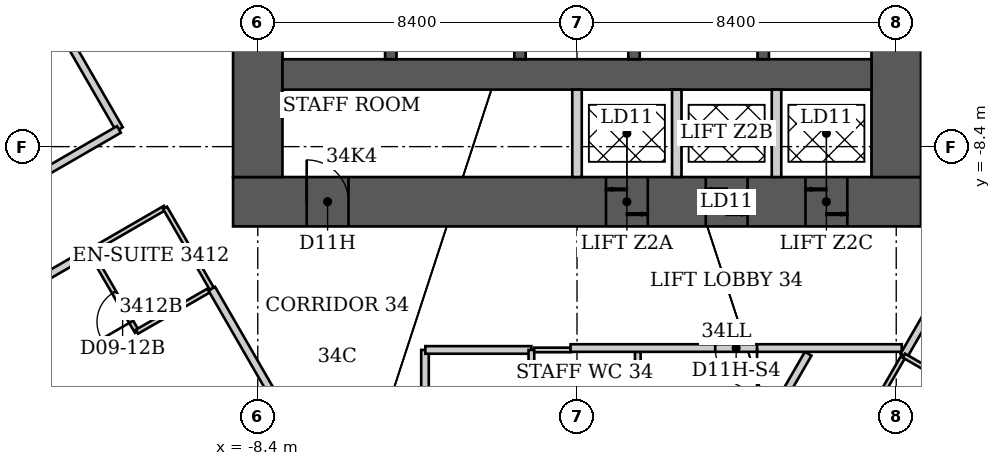
"""IFC4 building model, lengths in metres.
Left out: names, types, materials, properties, quantities, classifications, styles, units other than length and angle.
Written with IfcOpenShell. Run it as: python <this file> out.ifc"""

import sys

from ifc_helpers import new_model, si_unit, direction, frame, frame_2d, origin, place, context, subcontext, project, spatial, rectangle, extrude, element, fill, save


model = new_model("IFC4")
c1 = context("Model", 3, precision=1e-05, world=origin(), true_north=direction((0.0, 1.0)))
c2 = subcontext(c1, "Body", "Model", "MODEL_VIEW")
j1 = project(units=[si_unit("LENGTHUNIT", "METRE"), si_unit("PLANEANGLEUNIT", "RADIAN")], contexts=[c1])
p1 = place(None, origin())
s1 = spatial("IfcSite", under=j1, at=p1, CompositionType="ELEMENT")
p2 = place(p1, origin())
s2 = spatial("IfcBuilding", under=s1, at=p2, CompositionType="ELEMENT")
p3 = place(p2, frame((0.0, 0.0, 138.6)))
s3 = spatial("IfcBuildingStorey", under=s2, at=p3, CompositionType="ELEMENT", Elevation=138.6)
p4 = place(p3, frame((-9.05, -9.85, 0.0), z_axis=(0.0, 0.0, 1.0), x_axis=(1.0, 0.0, 0.0)))
e1 = element("IfcWall", 1, at=p4, inside=s3, PredefinedType="SHEAR", context=c2, shape_type="SweptSolid", body=[
    extrude(rectangle(XDim=18.1, YDim=1.3, at=frame_2d((9.05, 0.0))), origin(), (0.0, 0.0, 1.0), 3.8),
])
p5 = place(p4, frame((1.938, 0.0, 0.0)))
e2 = element("IfcOpeningElement", 2, at=p5, cuts=e1, PredefinedType="OPENING", context=c2, shape_type="SweptSolid", body=[
    extrude(rectangle(XDim=1.1, YDim=2.2, at=frame_2d((0.55, 1.1))), frame((0.0, 0.65, 0.0), z_axis=(0.0, -1.0, 0.0), x_axis=(1.0, 0.0, 0.0)), (0.0, 0.0, 1.0), 1.3),
])
p6 = place(p4, frame((9.812, 0.0, 0.0)))
e3 = element("IfcOpeningElement", 3, at=p6, cuts=e1, PredefinedType="OPENING", context=c2, shape_type="SweptSolid", body=[
    extrude(rectangle(XDim=1.1, YDim=2.1, at=frame_2d((0.55, 1.05))), frame((0.0, 0.65, 0.0), z_axis=(0.0, -1.0, 0.0), x_axis=(1.0, 0.0, 0.0)), (0.0, 0.0, 1.0), 1.3),
])
p7 = place(p4, frame((12.438, 0.0, 0.0)))
e4 = element("IfcOpeningElement", 4, at=p7, cuts=e1, PredefinedType="OPENING", context=c2, shape_type="SweptSolid", body=[
    extrude(rectangle(XDim=1.1, YDim=2.1, at=frame_2d((0.55, 1.05))), frame((0.0, 0.65, 0.0), z_axis=(0.0, -1.0, 0.0), x_axis=(1.0, 0.0, 0.0)), (0.0, 0.0, 1.0), 1.3),
])
p8 = place(p4, frame((15.062, 0.0, 0.0)))
e5 = element("IfcOpeningElement", 5, at=p8, cuts=e1, PredefinedType="OPENING", context=c2, shape_type="SweptSolid", body=[
    extrude(rectangle(XDim=1.1, YDim=2.1, at=frame_2d((0.55, 1.05))), frame((0.0, 0.65, 0.0), z_axis=(0.0, -1.0, 0.0), x_axis=(1.0, 0.0, 0.0)), (0.0, 0.0, 1.0), 1.3),
])
p9 = place(p3, frame((-8.4, -9.2, 0.0), z_axis=(0.0, 0.0, 1.0), x_axis=(0.0, 1.0, 0.0)))
e6 = element("IfcWall", 6, at=p9, inside=s3, PredefinedType="SHEAR", context=c2, shape_type="SweptSolid", body=[
    extrude(rectangle(XDim=15.3, YDim=1.3, at=frame_2d((7.65, 0.0))), origin(), (0.0, 0.0, 1.0), 3.8),
])
p10 = place(p9, frame((10.7, 0.0, 0.0)))
e7 = element("IfcOpeningElement", 7, at=p10, cuts=e6, PredefinedType="OPENING", context=c2, shape_type="SweptSolid", body=[
    extrude(rectangle(XDim=1.2, YDim=2.2, at=frame_2d((0.6, 1.1))), frame((0.0, 0.65, 0.0), z_axis=(0.0, -1.0, 0.0), x_axis=(1.0, 0.0, 0.0)), (0.0, 0.0, 1.0), 1.3),
])
p11 = place(p3, frame((8.4, -9.2, 0.0), z_axis=(0.0, 0.0, 1.0), x_axis=(0.0, 1.0, 0.0)))
e8 = element("IfcWall", 8, at=p11, inside=s3, PredefinedType="SHEAR", context=c2, shape_type="SweptSolid", body=[
    extrude(rectangle(XDim=15.3, YDim=1.3, at=frame_2d((7.65, 0.0))), origin(), (0.0, 0.0, 1.0), 3.8),
])
p12 = place(p11, frame((10.7, 0.0, 0.0)))
e9 = element("IfcOpeningElement", 9, at=p12, cuts=e8, PredefinedType="OPENING", context=c2, shape_type="SweptSolid", body=[
    extrude(rectangle(XDim=1.2, YDim=2.2, at=frame_2d((0.6, 1.1))), frame((0.0, 0.65, 0.0), z_axis=(0.0, -1.0, 0.0), x_axis=(1.0, 0.0, 0.0)), (0.0, 0.0, 1.0), 1.3),
])
p13 = place(p3, frame((-7.75, -6.5, 0.0), z_axis=(0.0, 0.0, 1.0), x_axis=(1.0, 0.0, 0.0)))
e10 = element("IfcWall", 10, at=p13, inside=s3, PredefinedType="SHEAR", context=c2, shape_type="SweptSolid", body=[
    extrude(rectangle(XDim=15.5, YDim=0.8, at=frame_2d((7.75, 0.0))), origin(), (0.0, 0.0, 1.0), 3.8),
])
for number, where, z_axis, x_axis in (
    (11, (-4.9, -6.1, 0.0), (0.0, 0.0, 1.0), (0.0, 1.0, 0.0)),
    (12, (-1.5, -6.1, 0.0), (0.0, 0.0, 1.0), (0.0, 1.0, 0.0)),
    (13, (1.5, -6.1, 0.0), (0.0, 0.0, 1.0), (0.0, 1.0, 0.0)),
    (14, (4.9, -6.1, 0.0), (0.0, 0.0, 1.0), (0.0, 1.0, 0.0)),
):
    element("IfcWall", number, at=place(p3, frame(where, z_axis=z_axis, x_axis=x_axis)), inside=s3, PredefinedType="SHEAR", context=c2, shape_type="SweptSolid", body=[
        extrude(rectangle(XDim=7.2, YDim=0.3, at=frame_2d((3.6, 0.0))), origin(), (0.0, 0.0, 1.0), 3.8),
    ])
for number, where, z_axis, x_axis in (
    (15, (0.0, -9.2, 0.0), (0.0, 0.0, 1.0), (0.0, 1.0, 0.0)),
    (16, (2.625, -9.2, 0.0), (0.0, 0.0, 1.0), (0.0, 1.0, 0.0)),
    (17, (5.25, -9.2, 0.0), (0.0, 0.0, 1.0), (0.0, 1.0, 0.0)),
):
    element("IfcWall", number, at=place(p3, frame(where, z_axis=z_axis, x_axis=x_axis)), inside=s3, PredefinedType="PARTITIONING", context=c2, shape_type="SweptSolid", body=[
        extrude(rectangle(XDim=2.3, YDim=0.25, at=frame_2d((1.15, 0.0))), origin(), (0.0, 0.0, 1.0), 3.8),
    ])
p14 = place(p3, frame((-17.824, -14.045, 0.0), z_axis=(0.0, 0.0, 1.0), x_axis=(0.866007919525, 0.500030282404, 0.0)))
e18 = element("IfcWall", 18, at=p14, inside=s3, PredefinedType="PARTITIONING", context=c2, shape_type="SweptSolid", body=[
    extrude(rectangle(XDim=5.79, YDim=0.2, at=frame_2d((2.895, 0.0))), origin(), (0.0, 0.0, 1.0), 3.64),
])
p15 = place(p14, frame((2.395, 0.0, 0.0)))
e19 = element("IfcOpeningElement", 19, at=p15, cuts=e18, PredefinedType="OPENING", context=c2, shape_type="SweptSolid", body=[
    extrude(rectangle(XDim=1.0, YDim=2.13, at=frame_2d((0.5, 1.065))), frame((0.0, 0.1, 0.0), z_axis=(0.0, -1.0, 0.0), x_axis=(1.0, 0.0, 0.0)), (0.0, 0.0, 1.0), 0.2),
])
p16 = place(p3, frame((-16.4, -0.38, 0.0), z_axis=(0.0, 0.0, 1.0), x_axis=(0.499575523811, -0.866270336563, 0.0)))
e20 = element("IfcWall", 20, at=p16, inside=s3, PredefinedType="PARTITIONING", context=c2, shape_type="SweptSolid", body=[
    extrude(rectangle(XDim=8.727, YDim=0.2, at=frame_2d((4.364, 0.0))), origin(), (0.0, 0.0, 1.0), 3.64),
])
p17 = place(p16, frame((3.864, 0.0, 0.0)))
e21 = element("IfcOpeningElement", 21, at=p17, cuts=e20, PredefinedType="OPENING", context=c2, shape_type="SweptSolid", body=[
    extrude(rectangle(XDim=1.0, YDim=2.13, at=frame_2d((0.5, 1.065))), frame((0.0, 0.1, 0.0), z_axis=(0.0, -1.0, 0.0), x_axis=(1.0, 0.0, 0.0)), (0.0, 0.0, 1.0), 0.2),
])
p18 = place(p3, frame((-12.81, -11.15, 0.0), z_axis=(0.0, 0.0, 1.0), x_axis=(0.501813488763, -0.864975850817, 0.0)))
e22 = element("IfcWall", 22, at=p18, inside=s3, PredefinedType="PARTITIONING", context=c2, shape_type="SweptSolid", body=[
    extrude(rectangle(XDim=2.451, YDim=0.12, at=frame_2d((1.226, 0.0))), origin(), (0.0, 0.0, 1.0), 3.64),
])
p19 = place(p18, frame((1.251, 0.0, 0.0)))
e23 = element("IfcOpeningElement", 23, at=p19, cuts=e22, PredefinedType="OPENING", context=c2, shape_type="SweptSolid", body=[
    extrude(rectangle(XDim=0.9, YDim=2.03, at=frame_2d((0.45, 1.015))), frame((0.0, 0.06, 0.0), z_axis=(0.0, -1.0, 0.0), x_axis=(1.0, 0.0, 0.0)), (0.0, 0.0, 1.0), 0.12),
])
p20 = place(p3, frame((-12.81, -11.15, 0.0), z_axis=(0.0, 0.0, 1.0), x_axis=(0.865543766642, 0.500833293649, 0.0)))
e24 = element("IfcWall", 24, at=p20, inside=s3, PredefinedType="PARTITIONING", context=c2, shape_type="SweptSolid", body=[
    extrude(rectangle(XDim=2.276, YDim=0.12, at=frame_2d((1.138, 0.0))), origin(), (0.0, 0.0, 1.0), 3.64),
])
p21 = place(p3, frame((-12.053, -7.948, 0.0), z_axis=(0.0, 0.0, 1.0), x_axis=(-0.865882003792, -0.500248293859, 0.0)))
e25 = element("IfcWall", 25, at=p21, inside=s3, PredefinedType="PARTITIONING", context=c2, shape_type="SweptSolid", body=[
    extrude(rectangle(XDim=8.051, YDim=0.2, at=frame_2d((4.025, 0.0))), origin(), (0.0, 0.0, 1.0), 3.64),
])
p22 = place(p3, frame((-11.58, -13.27, 0.0), z_axis=(0.0, 0.0, 1.0), x_axis=(0.867428373024, 0.497562074192, 0.0)))
e26 = element("IfcWall", 26, at=p22, inside=s3, PredefinedType="PARTITIONING", context=c2, shape_type="SweptSolid", body=[
    extrude(rectangle(XDim=2.271, YDim=0.12, at=frame_2d((1.136, 0.0))), origin(), (0.0, 0.0, 1.0), 3.64),
])
p23 = place(p3, frame((-10.84, -10.01, 0.0), z_axis=(0.0, 0.0, 1.0), x_axis=(0.500089055364, -0.86597398154, 0.0)))
e27 = element("IfcWall", 27, at=p23, inside=s3, PredefinedType="PARTITIONING", context=c2, shape_type="SweptSolid", body=[
    extrude(rectangle(XDim=2.459, YDim=0.12, at=frame_2d((1.23, 0.0))), origin(), (0.0, 0.0, 1.0), 3.64),
])
p24 = place(p3, frame((-9.61, -12.14, 0.0), z_axis=(0.0, 0.0, 1.0), x_axis=(0.499898533245, -0.866083977718, 0.0)))
e28 = element("IfcWall", 28, at=p24, inside=s3, PredefinedType="PARTITIONING", context=c2, shape_type="SweptSolid", body=[
    extrude(rectangle(XDim=4.561, YDim=0.2, at=frame_2d((2.281, 0.0))), origin(), (0.0, 0.0, 1.0), 3.64),
])
p25 = place(p3, frame((-4.0, -17.46, 0.0), z_axis=(0.0, 0.0, 1.0), x_axis=(0.0, 1.0, 0.0)))
e29 = element("IfcWall", 29, at=p25, inside=s3, PredefinedType="PARTITIONING", context=c2, shape_type="SweptSolid", body=[
    extrude(rectangle(XDim=3.71, YDim=0.2, at=frame_2d((1.855, 0.0))), origin(), (0.0, 0.0, 1.0), 2.878),
])
p26 = place(p25, frame((1.305, 0.0, 0.0)))
e30 = element("IfcOpeningElement", 30, at=p26, cuts=e29, PredefinedType="OPENING", context=c2, shape_type="SweptSolid", body=[
    extrude(rectangle(XDim=1.1, YDim=2.2, at=frame_2d((0.55, 1.1))), frame((0.0, 0.1, 0.0), z_axis=(0.0, -1.0, 0.0), x_axis=(1.0, 0.0, 0.0)), (0.0, 0.0, 1.0), 0.2),
])
p27 = place(p3, frame((-3.99, -13.75, 0.0), z_axis=(0.0, 0.0, 1.0), x_axis=(1.0, 0.0, 0.0)))
e31 = element("IfcWall", 31, at=p27, inside=s3, PredefinedType="PARTITIONING", context=c2, shape_type="SweptSolid", body=[
    extrude(rectangle(XDim=2.79, YDim=0.2, at=frame_2d((1.395, 0.0))), origin(), (0.0, 0.0, 1.0), 3.64),
])
p28 = place(p3, frame((-1.2, -13.75, 0.0), z_axis=(0.0, 0.0, 1.0), x_axis=(0.0, -1.0, 0.0)))
e32 = element("IfcWall", 32, at=p28, inside=s3, PredefinedType="PARTITIONING", context=c2, shape_type="SweptSolid", body=[
    extrude(rectangle(XDim=4.14, YDim=0.15, at=frame_2d((2.07, 0.0))), origin(), (0.0, 0.0, 1.0), 3.64),
])
p29 = place(p3, frame((-1.125, -13.75, 0.0), z_axis=(0.0, 0.0, 1.0), x_axis=(1.0, 0.0, 0.0)))
e33 = element("IfcWall", 33, at=p29, inside=s3, PredefinedType="PARTITIONING", context=c2, shape_type="SweptSolid", body=[
    extrude(rectangle(XDim=0.955, YDim=0.12, at=frame_2d((0.478, 0.0))), origin(), (0.0, 0.0, 1.0), 3.64),
])
p30 = place(p3, frame((1.6, -13.8, 0.0), z_axis=(0.0, 0.0, 1.0), x_axis=(0.0, -1.0, 0.0)))
e34 = element("IfcWall", 34, at=p30, inside=s3, PredefinedType="PARTITIONING", context=c2, shape_type="SweptSolid", body=[
    extrude(rectangle(XDim=4.09, YDim=0.15, at=frame_2d((2.045, 0.0))), origin(), (0.0, 0.0, 1.0), 3.64),
])
p31 = place(p3, frame((6.083, -13.85, 0.0), z_axis=(0.0, 0.0, 1.0), x_axis=(-0.499977643516, -0.866038310922, 0.0)))
e35 = element("IfcWall", 35, at=p31, inside=s3, PredefinedType="PARTITIONING", context=c2, shape_type="SweptSolid", body=[
    extrude(rectangle(XDim=4.665, YDim=0.2, at=frame_2d((2.333, 0.0))), origin(), (0.0, 0.0, 1.0), 3.64),
])
p32 = place(p3, frame((7.33, -16.09, 0.0), z_axis=(0.0, 0.0, 1.0), x_axis=(0.501632941931, 0.865080569409, 0.0)))
e36 = element("IfcWall", 36, at=p32, inside=s3, PredefinedType="PARTITIONING", context=c2, shape_type="SweptSolid", body=[
    extrude(rectangle(XDim=2.532, YDim=0.12, at=frame_2d((1.266, 0.0))), origin(), (0.0, 0.0, 1.0), 3.64),
])
p33 = place(p3, frame((8.545, -13.7, 0.0), z_axis=(0.0, 0.0, 1.0), x_axis=(-1.0, 0.0, 0.0)))
e37 = element("IfcWall", 37, at=p33, inside=s3, PredefinedType="PARTITIONING", context=c2, shape_type="SweptSolid", body=[
    extrude(rectangle(XDim=8.715, YDim=0.2, at=frame_2d((4.357, 0.0))), origin(), (0.0, 0.0, 1.0), 3.64),
])
p34 = place(p33, frame((3.808, 0.0, 0.0)))
e38 = element("IfcOpeningElement", 38, at=p34, cuts=e37, PredefinedType="OPENING", context=c2, shape_type="SweptSolid", body=[
    extrude(rectangle(XDim=1.1, YDim=2.2, at=frame_2d((0.55, 1.1))), frame((0.0, 0.1, 0.0), z_axis=(0.0, -1.0, 0.0), x_axis=(1.0, 0.0, 0.0)), (0.0, 0.0, 1.0), 0.2),
])
p35 = place(p3, frame((8.6, -13.9, 0.0), z_axis=(0.0, 0.0, 1.0), x_axis=(0.499505868716, 0.866310502717, 0.0)))
e39 = element("IfcWall", 39, at=p35, inside=s3, PredefinedType="PARTITIONING", context=c2, shape_type="SweptSolid", body=[
    extrude(rectangle(XDim=8.588, YDim=0.2, at=frame_2d((4.294, 0.0))), origin(), (0.0, 0.0, 1.0), 3.64),
])
p36 = place(p35, frame((3.794, 0.0, 0.0)))
e40 = element("IfcOpeningElement", 40, at=p36, cuts=e39, PredefinedType="OPENING", context=c2, shape_type="SweptSolid", body=[
    extrude(rectangle(XDim=1.0, YDim=2.13, at=frame_2d((0.5, 1.065))), frame((0.0, 0.1, 0.0), z_axis=(0.0, -1.0, 0.0), x_axis=(1.0, 0.0, 0.0)), (0.0, 0.0, 1.0), 0.2),
])
p37 = place(p3, frame((10.63, -15.07, 0.0), z_axis=(0.0, 0.0, 1.0), x_axis=(-0.866345142729, 0.499445786517, 0.0)))
e41 = element("IfcWall", 41, at=p37, inside=s3, PredefinedType="PARTITIONING", context=c2, shape_type="SweptSolid", body=[
    extrude(rectangle(XDim=2.343, YDim=0.12, at=frame_2d((1.171, 0.0))), origin(), (0.0, 0.0, 1.0), 3.64),
])
p38 = place(p19, origin())
e42 = element("IfcDoor", 42, at=p38, inside=s3, OperationType="SINGLE_SWING_RIGHT", PredefinedType="DOOR", context=c2, shape_type="SweptSolid", body=[
    extrude(rectangle(XDim=0.9, YDim=2.03, at=frame_2d((0.45, 1.015))), frame((0.0, 0.025, 0.0), z_axis=(0.0, -1.0, 0.0), x_axis=(1.0, 0.0, 0.0)), (0.0, 0.0, 1.0), 0.05),
])
fill(e23, e42)
p39 = place(p34, origin())
e43 = element("IfcDoor", 43, at=p39, inside=s3, OperationType="SINGLE_SWING_LEFT", PredefinedType="DOOR", context=c2, shape_type="SweptSolid", body=[
    extrude(rectangle(XDim=1.1, YDim=2.2, at=frame_2d((0.55, 1.1))), frame((0.0, 0.025, 0.0), z_axis=(0.0, -1.0, 0.0), x_axis=(1.0, 0.0, 0.0)), (0.0, 0.0, 1.0), 0.05),
])
fill(e38, e43)
p40 = place(p5, origin())
e44 = element("IfcDoor", 44, at=p40, inside=s3, OperationType="SINGLE_SWING_LEFT", PredefinedType="DOOR", context=c2, shape_type="SweptSolid", body=[
    extrude(rectangle(XDim=1.1, YDim=2.2, at=frame_2d((0.55, 1.1))), frame((0.0, 0.025, 0.0), z_axis=(0.0, -1.0, 0.0), x_axis=(1.0, 0.0, 0.0)), (0.0, 0.0, 1.0), 0.05),
])
fill(e2, e44)
p41 = place(p6, origin())
e45 = element("IfcDoor", 45, at=p41, inside=s3, OperationType="DOUBLE_DOOR_SLIDING", PredefinedType="DOOR", context=c2, shape_type="SweptSolid", body=[
    extrude(rectangle(XDim=1.1, YDim=2.1, at=frame_2d((0.55, 1.05))), frame((0.0, 0.025, 0.0), z_axis=(0.0, -1.0, 0.0), x_axis=(1.0, 0.0, 0.0)), (0.0, 0.0, 1.0), 0.05),
])
fill(e3, e45)
p42 = place(p7, origin())
e46 = element("IfcDoor", 46, at=p42, inside=s3, OperationType="DOUBLE_DOOR_SLIDING", PredefinedType="DOOR", context=c2, shape_type="SweptSolid", body=[
    extrude(rectangle(XDim=1.1, YDim=2.1, at=frame_2d((0.55, 1.05))), frame((0.0, 0.025, 0.0), z_axis=(0.0, -1.0, 0.0), x_axis=(1.0, 0.0, 0.0)), (0.0, 0.0, 1.0), 0.05),
])
fill(e4, e46)
p43 = place(p8, origin())
e47 = element("IfcDoor", 47, at=p43, inside=s3, OperationType="DOUBLE_DOOR_SLIDING", PredefinedType="DOOR", context=c2, shape_type="SweptSolid", body=[
    extrude(rectangle(XDim=1.1, YDim=2.1, at=frame_2d((0.55, 1.05))), frame((0.0, 0.025, 0.0), z_axis=(0.0, -1.0, 0.0), x_axis=(1.0, 0.0, 0.0)), (0.0, 0.0, 1.0), 0.05),
])
fill(e5, e47)
save(model, sys.argv[1])
